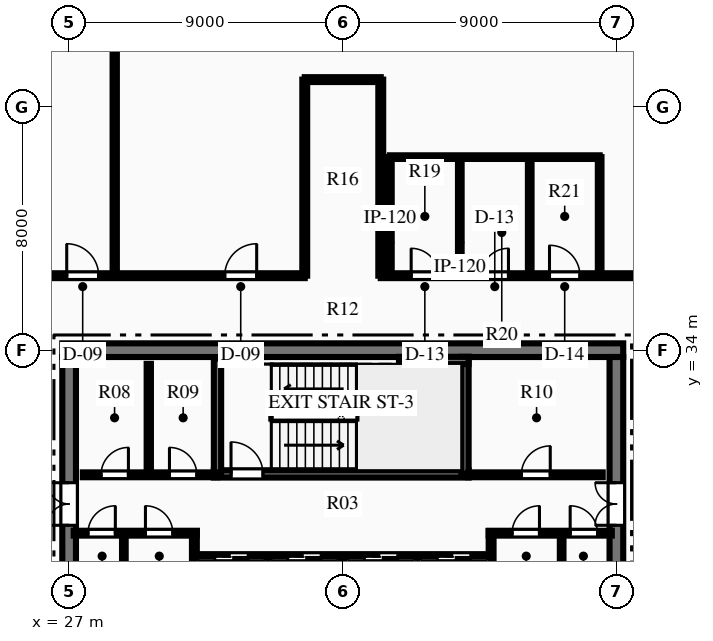
"""IFC4 building model, lengths in metres.
Left out: names, types, materials, properties, quantities, classifications, styles, units other than length and angle.
Written with IfcOpenShell. Run it as: python <this file> out.ifc"""

import sys

from ifc_helpers import new_model, si_unit, direction, frame, frame_2d, origin, place, context, subcontext, project, spatial, rectangle, extrude, element, fill, save


model = new_model("IFC4")
c1 = context("Model", 3, precision=1e-05, world=origin(), true_north=direction((0.0, 1.0)))
c2 = subcontext(c1, "Body", "Model", "MODEL_VIEW")
j1 = project(units=[si_unit("LENGTHUNIT", "METRE"), si_unit("PLANEANGLEUNIT", "RADIAN")], contexts=[c1])
p1 = place(None, origin())
s1 = spatial("IfcSite", under=j1, at=p1, CompositionType="ELEMENT")
p2 = place(p1, origin())
s2 = spatial("IfcBuilding", under=s1, at=p2, CompositionType="ELEMENT")
p3 = place(p2, frame((0.0, 0.0, 248.7)))
s3 = spatial("IfcBuildingStorey", under=s2, at=p3, CompositionType="ELEMENT", Elevation=248.7)
p4 = place(p3, frame((26.775, 34.0, 0.0), z_axis=(0.0, 0.0, 1.0), x_axis=(1.0, 0.0, 0.0)))
e1 = element("IfcWall", 1, at=p4, inside=s3, PredefinedType="SHEAR", context=c2, shape_type="SweptSolid", body=[
    extrude(rectangle(XDim=18.45, YDim=0.45, at=frame_2d((9.225, 0.0))), origin(), (0.0, 0.0, 1.0), 3.75),
])
p5 = place(p3, frame((27.0, 18.225, 0.0), z_axis=(0.0, 0.0, 1.0), x_axis=(0.0, 1.0, 0.0)))
e2 = element("IfcWall", 2, at=p5, inside=s3, PredefinedType="SHEAR", context=c2, shape_type="SweptSolid", body=[
    extrude(rectangle(XDim=15.55, YDim=0.45, at=frame_2d((7.775, 0.0))), origin(), (0.0, 0.0, 1.0), 3.75),
])
p6 = place(p5, frame((10.015, 0.0, 0.0)))
e3 = element("IfcOpeningElement", 3, at=p6, cuts=e2, PredefinedType="OPENING", context=c2, shape_type="SweptSolid", body=[
    extrude(rectangle(XDim=1.4, YDim=2.2, at=frame_2d((0.7, 1.1))), frame((0.0, 0.235, 0.0), z_axis=(0.0, -1.0, 0.0), x_axis=(1.0, 0.0, 0.0)), (0.0, 0.0, 1.0), 0.47),
])
p7 = place(p3, frame((45.0, 18.225, 0.0), z_axis=(0.0, 0.0, 1.0), x_axis=(0.0, 1.0, 0.0)))
e4 = element("IfcWall", 4, at=p7, inside=s3, PredefinedType="SHEAR", context=c2, shape_type="SweptSolid", body=[
    extrude(rectangle(XDim=15.55, YDim=0.45, at=frame_2d((7.775, 0.0))), origin(), (0.0, 0.0, 1.0), 3.75),
])
p8 = place(p7, frame((10.015, 0.0, 0.0)))
e5 = element("IfcOpeningElement", 5, at=p8, cuts=e4, PredefinedType="OPENING", context=c2, shape_type="SweptSolid", body=[
    extrude(rectangle(XDim=1.4, YDim=2.2, at=frame_2d((0.7, 1.1))), frame((0.0, 0.235, 0.0), z_axis=(0.0, -1.0, 0.0), x_axis=(1.0, 0.0, 0.0)), (0.0, 0.0, 1.0), 0.47),
])
p9 = place(p3, frame((31.76, 29.93, 0.0), z_axis=(0.0, 0.0, 1.0), x_axis=(1.0, 0.0, 0.0)))
e6 = element("IfcWall", 6, at=p9, inside=s3, PredefinedType="SHEAR", context=c2, shape_type="SweptSolid", body=[
    extrude(rectangle(XDim=8.38, YDim=0.24, at=frame_2d((4.19, 0.0))), origin(), (0.0, 0.0, 1.0), 3.75),
])
p10 = place(p9, frame((0.565, 0.0, 0.0)))
e7 = element("IfcOpeningElement", 7, at=p10, cuts=e6, PredefinedType="OPENING", context=c2, shape_type="SweptSolid", body=[
    extrude(rectangle(XDim=1.05, YDim=2.15, at=frame_2d((0.525, 1.075))), frame((0.0, 0.13, 0.0), z_axis=(0.0, -1.0, 0.0), x_axis=(1.0, 0.0, 0.0)), (0.0, 0.0, 1.0), 0.26),
])
p11 = place(p3, frame((31.88, 29.93, 0.0), z_axis=(0.0, 0.0, 1.0), x_axis=(0.0, 1.0, 0.0)))
e8 = element("IfcWall", 8, at=p11, inside=s3, PredefinedType="SHEAR", context=c2, shape_type="SweptSolid", body=[
    extrude(rectangle(XDim=3.79, YDim=0.24, at=frame_2d((1.895, 0.0))), origin(), (0.0, 0.0, 1.0), 3.75),
])
p12 = place(p3, frame((40.02, 29.93, 0.0), z_axis=(0.0, 0.0, 1.0), x_axis=(0.0, 1.0, 0.0)))
e9 = element("IfcWall", 9, at=p12, inside=s3, PredefinedType="SHEAR", context=c2, shape_type="SweptSolid", body=[
    extrude(rectangle(XDim=3.85, YDim=0.24, at=frame_2d((1.925, 0.0))), origin(), (0.0, 0.0, 1.0), 3.75),
])
p13 = place(p3, frame((37.85, 33.66, 0.0), z_axis=(0.0, 0.0, 1.0), x_axis=(1.0, 0.0, 0.0)))
e10 = element("IfcWall", 10, at=p13, inside=s3, PredefinedType="SHEAR", context=c2, shape_type="SweptSolid", body=[
    extrude(rectangle(XDim=2.29, YDim=0.24, at=frame_2d((1.145, 0.0))), origin(), (0.0, 0.0, 1.0), 3.75),
])
p14 = place(p3, frame((27.15, 27.98, 0.0), z_axis=(0.0, 0.0, 1.0), x_axis=(1.0, 0.0, 0.0)))
e11 = element("IfcWall", 11, at=p14, inside=s3, PredefinedType="PARTITIONING", context=c2, shape_type="SweptSolid", body=[
    extrude(rectangle(XDim=4.05, YDim=0.16, at=frame_2d((2.025, 0.0))), origin(), (0.0, 0.0, 1.0), 3.48),
])
p15 = place(p14, frame((0.47, 0.0, 0.0)))
e12 = element("IfcOpeningElement", 12, at=p15, cuts=e11, PredefinedType="OPENING", context=c2, shape_type="SweptSolid", body=[
    extrude(rectangle(XDim=0.9, YDim=2.15, at=frame_2d((0.45, 1.075))), frame((0.0, 0.09, 0.0), z_axis=(0.0, -1.0, 0.0), x_axis=(1.0, 0.0, 0.0)), (0.0, 0.0, 1.0), 0.18),
])
p16 = place(p14, frame((2.36, 0.0, 0.0)))
e13 = element("IfcOpeningElement", 13, at=p16, cuts=e11, PredefinedType="OPENING", context=c2, shape_type="SweptSolid", body=[
    extrude(rectangle(XDim=0.9, YDim=2.15, at=frame_2d((0.45, 1.075))), frame((0.0, 0.09, 0.0), z_axis=(0.0, -1.0, 0.0), x_axis=(1.0, 0.0, 0.0)), (0.0, 0.0, 1.0), 0.18),
])
p17 = place(p3, frame((31.12, 26.54, 0.0), z_axis=(0.0, 0.0, 1.0), x_axis=(0.0, 1.0, 0.0)))
e14 = element("IfcWall", 14, at=p17, inside=s3, PredefinedType="PARTITIONING", context=c2, shape_type="SweptSolid", body=[
    extrude(rectangle(XDim=1.51, YDim=0.16, at=frame_2d((0.755, 0.0))), origin(), (0.0, 0.0, 1.0), 3.48),
])
p18 = place(p3, frame((40.8, 27.98, 0.0), z_axis=(0.0, 0.0, 1.0), x_axis=(1.0, 0.0, 0.0)))
e15 = element("IfcWall", 15, at=p18, inside=s3, PredefinedType="PARTITIONING", context=c2, shape_type="SweptSolid", body=[
    extrude(rectangle(XDim=4.05, YDim=0.16, at=frame_2d((2.025, 0.0))), origin(), (0.0, 0.0, 1.0), 3.48),
])
p19 = place(p18, frame((0.77, 0.0, 0.0)))
e16 = element("IfcOpeningElement", 16, at=p19, cuts=e15, PredefinedType="OPENING", context=c2, shape_type="SweptSolid", body=[
    extrude(rectangle(XDim=0.9, YDim=2.15, at=frame_2d((0.45, 1.075))), frame((0.0, 0.09, 0.0), z_axis=(0.0, -1.0, 0.0), x_axis=(1.0, 0.0, 0.0)), (0.0, 0.0, 1.0), 0.18),
])
p20 = place(p18, frame((2.68, 0.0, 0.0)))
e17 = element("IfcOpeningElement", 17, at=p20, cuts=e15, PredefinedType="OPENING", context=c2, shape_type="SweptSolid", body=[
    extrude(rectangle(XDim=0.9, YDim=2.15, at=frame_2d((0.45, 1.075))), frame((0.0, 0.09, 0.0), z_axis=(0.0, -1.0, 0.0), x_axis=(1.0, 0.0, 0.0)), (0.0, 0.0, 1.0), 0.18),
])
p21 = place(p3, frame((40.88, 26.54, 0.0), z_axis=(0.0, 0.0, 1.0), x_axis=(0.0, 1.0, 0.0)))
e18 = element("IfcWall", 18, at=p21, inside=s3, PredefinedType="PARTITIONING", context=c2, shape_type="SweptSolid", body=[
    extrude(rectangle(XDim=1.51, YDim=0.16, at=frame_2d((0.755, 0.0))), origin(), (0.0, 0.0, 1.0), 3.48),
])
for number, where, z_axis, x_axis in (
    (19, (28.8, 26.54, 0.0), (0.0, 0.0, 1.0), (0.0, 1.0, 0.0)),
    (20, (43.2, 26.54, 0.0), (0.0, 0.0, 1.0), (0.0, 1.0, 0.0)),
):
    element("IfcWall", number, at=place(p3, frame(where, z_axis=z_axis, x_axis=x_axis)), inside=s3, PredefinedType="PARTITIONING", context=c2, shape_type="SweptSolid", body=[
        extrude(rectangle(XDim=1.44, YDim=0.12, at=frame_2d((0.72, 0.0))), origin(), (0.0, 0.0, 1.0), 3.48),
    ])
p22 = place(p3, frame((27.45, 29.9, 0.0), z_axis=(0.0, 0.0, 1.0), x_axis=(1.0, 0.0, 0.0)))
e21 = element("IfcWall", 21, at=p22, inside=s3, PredefinedType="PARTITIONING", context=c2, shape_type="SweptSolid", body=[
    extrude(rectangle(XDim=4.43, YDim=0.16, at=frame_2d((2.215, 0.0))), origin(), (0.0, 0.0, 1.0), 3.48),
])
p23 = place(p22, frame((0.6, 0.0, 0.0)))
e22 = element("IfcOpeningElement", 22, at=p23, cuts=e21, PredefinedType="OPENING", context=c2, shape_type="SweptSolid", body=[
    extrude(rectangle(XDim=0.9, YDim=2.15, at=frame_2d((0.45, 1.075))), frame((0.0, 0.09, 0.0), z_axis=(0.0, -1.0, 0.0), x_axis=(1.0, 0.0, 0.0)), (0.0, 0.0, 1.0), 0.18),
])
p24 = place(p22, frame((2.85, 0.0, 0.0)))
e23 = element("IfcOpeningElement", 23, at=p24, cuts=e21, PredefinedType="OPENING", context=c2, shape_type="SweptSolid", body=[
    extrude(rectangle(XDim=0.9, YDim=2.15, at=frame_2d((0.45, 1.075))), frame((0.0, 0.09, 0.0), z_axis=(0.0, -1.0, 0.0), x_axis=(1.0, 0.0, 0.0)), (0.0, 0.0, 1.0), 0.18),
])
p25 = place(p3, frame((29.62, 29.95, 0.0), z_axis=(0.0, 0.0, 1.0), x_axis=(0.0, 1.0, 0.0)))
e24 = element("IfcWall", 24, at=p25, inside=s3, PredefinedType="PARTITIONING", context=c2, shape_type="SweptSolid", body=[
    extrude(rectangle(XDim=3.6, YDim=0.14, at=frame_2d((1.8, 0.0))), origin(), (0.0, 0.0, 1.0), 3.48),
])
p26 = place(p3, frame((40.12, 29.9, 0.0), z_axis=(0.0, 0.0, 1.0), x_axis=(1.0, 0.0, 0.0)))
e25 = element("IfcWall", 25, at=p26, inside=s3, PredefinedType="PARTITIONING", context=c2, shape_type="SweptSolid", body=[
    extrude(rectangle(XDim=4.43, YDim=0.16, at=frame_2d((2.215, 0.0))), origin(), (0.0, 0.0, 1.0), 3.48),
])
p27 = place(p26, frame((1.755, 0.0, 0.0)))
e26 = element("IfcOpeningElement", 26, at=p27, cuts=e25, PredefinedType="OPENING", context=c2, shape_type="SweptSolid", body=[
    extrude(rectangle(XDim=0.95, YDim=2.15, at=frame_2d((0.475, 1.075))), frame((0.0, 0.09, 0.0), z_axis=(0.0, -1.0, 0.0), x_axis=(1.0, 0.0, 0.0)), (0.0, 0.0, 1.0), 0.18),
])
p28 = place(p3, frame((31.2, 27.2, 0.0), z_axis=(0.0, 0.0, 1.0), x_axis=(1.0, 0.0, 0.0)))
e27 = element("IfcWall", 27, at=p28, inside=s3, PredefinedType="PARTITIONING", context=c2, shape_type="SweptSolid", body=[
    extrude(rectangle(XDim=9.6, YDim=0.18, at=frame_2d((4.8, 0.0))), origin(), (0.0, 0.0, 1.0), 3.48),
])
p29 = place(p28, frame((0.59, 0.0, 0.0)))
e28 = element("IfcOpeningElement", 28, at=p29, cuts=e27, PredefinedType="OPENING", context=c2, shape_type="SweptSolid", body=[
    extrude(rectangle(XDim=1.1, YDim=2.15, at=frame_2d((0.55, 1.075))), frame((0.0, 0.1, 0.0), z_axis=(0.0, -1.0, 0.0), x_axis=(1.0, 0.0, 0.0)), (0.0, 0.0, 1.0), 0.2),
])
p30 = place(p28, frame((2.99, 0.0, 0.0)))
e29 = element("IfcOpeningElement", 29, at=p30, cuts=e27, PredefinedType="OPENING", context=c2, shape_type="SweptSolid", body=[
    extrude(rectangle(XDim=1.1, YDim=2.15, at=frame_2d((0.55, 1.075))), frame((0.0, 0.1, 0.0), z_axis=(0.0, -1.0, 0.0), x_axis=(1.0, 0.0, 0.0)), (0.0, 0.0, 1.0), 0.2),
])
p31 = place(p28, frame((5.51, 0.0, 0.0)))
e30 = element("IfcOpeningElement", 30, at=p31, cuts=e27, PredefinedType="OPENING", context=c2, shape_type="SweptSolid", body=[
    extrude(rectangle(XDim=1.1, YDim=2.15, at=frame_2d((0.55, 1.075))), frame((0.0, 0.1, 0.0), z_axis=(0.0, -1.0, 0.0), x_axis=(1.0, 0.0, 0.0)), (0.0, 0.0, 1.0), 0.2),
])
p32 = place(p28, frame((7.91, 0.0, 0.0)))
e31 = element("IfcOpeningElement", 31, at=p32, cuts=e27, PredefinedType="OPENING", context=c2, shape_type="SweptSolid", body=[
    extrude(rectangle(XDim=1.1, YDim=2.15, at=frame_2d((0.55, 1.075))), frame((0.0, 0.1, 0.0), z_axis=(0.0, -1.0, 0.0), x_axis=(1.0, 0.0, 0.0)), (0.0, 0.0, 1.0), 0.2),
])
for number, where, z_axis, x_axis in (
    (32, (33.54, 25.3, 0.0), (0.0, 0.0, 1.0), (0.0, 1.0, 0.0)),
    (33, (36.0, 25.3, 0.0), (0.0, 0.0, 1.0), (0.0, 1.0, 0.0)),
    (34, (38.46, 25.3, 0.0), (0.0, 0.0, 1.0), (0.0, 1.0, 0.0)),
):
    element("IfcWall", number, at=place(p3, frame(where, z_axis=z_axis, x_axis=x_axis)), inside=s3, PredefinedType="PARTITIONING", context=c2, shape_type="SweptSolid", body=[
        extrude(rectangle(XDim=1.9, YDim=0.18, at=frame_2d((0.95, 0.0))), origin(), (0.0, 0.0, 1.0), 3.48),
    ])
p33 = place(p3, frame((24.5, 36.45, 0.0), z_axis=(0.0, 0.0, 1.0), x_axis=(1.0, 0.0, 0.0)))
e35 = element("IfcWall", 35, at=p33, inside=s3, PredefinedType="PARTITIONING", context=c2, shape_type="SweptSolid", body=[
    extrude(rectangle(XDim=10.25, YDim=0.16, at=frame_2d((5.125, 0.0))), origin(), (0.0, 0.0, 1.0), 3.48),
])
p34 = place(p33, frame((2.421, 0.0, 0.0)))
e36 = element("IfcOpeningElement", 36, at=p34, cuts=e35, PredefinedType="OPENING", context=c2, shape_type="SweptSolid", body=[
    extrude(rectangle(XDim=1.05, YDim=2.15, at=frame_2d((0.525, 1.075))), frame((0.0, 0.09, 0.0), z_axis=(0.0, -1.0, 0.0), x_axis=(1.0, 0.0, 0.0)), (0.0, 0.0, 1.0), 0.18),
])
p35 = place(p33, frame((7.619, 0.0, 0.0)))
e37 = element("IfcOpeningElement", 37, at=p35, cuts=e35, PredefinedType="OPENING", context=c2, shape_type="SweptSolid", body=[
    extrude(rectangle(XDim=1.05, YDim=2.15, at=frame_2d((0.525, 1.075))), frame((0.0, 0.09, 0.0), z_axis=(0.0, -1.0, 0.0), x_axis=(1.0, 0.0, 0.0)), (0.0, 0.0, 1.0), 0.18),
])
p36 = place(p3, frame((37.25, 36.45, 0.0), z_axis=(0.0, 0.0, 1.0), x_axis=(1.0, 0.0, 0.0)))
e38 = element("IfcWall", 38, at=p36, inside=s3, PredefinedType="PARTITIONING", context=c2, shape_type="SweptSolid", body=[
    extrude(rectangle(XDim=10.25, YDim=0.16, at=frame_2d((5.125, 0.0))), origin(), (0.0, 0.0, 1.0), 3.48),
])
p37 = place(p36, frame((1.0, 0.0, 0.0)))
e39 = element("IfcOpeningElement", 39, at=p37, cuts=e38, PredefinedType="OPENING", context=c2, shape_type="SweptSolid", body=[
    extrude(rectangle(XDim=0.9, YDim=2.15, at=frame_2d((0.45, 1.075))), frame((0.0, 0.09, 0.0), z_axis=(0.0, -1.0, 0.0), x_axis=(1.0, 0.0, 0.0)), (0.0, 0.0, 1.0), 0.18),
])
p38 = place(p36, frame((3.3, 0.0, 0.0)))
e40 = element("IfcOpeningElement", 40, at=p38, cuts=e38, PredefinedType="OPENING", context=c2, shape_type="SweptSolid", body=[
    extrude(rectangle(XDim=0.9, YDim=2.15, at=frame_2d((0.45, 1.075))), frame((0.0, 0.09, 0.0), z_axis=(0.0, -1.0, 0.0), x_axis=(1.0, 0.0, 0.0)), (0.0, 0.0, 1.0), 0.18),
])
p39 = place(p36, frame((5.55, 0.0, 0.0)))
e41 = element("IfcOpeningElement", 41, at=p39, cuts=e38, PredefinedType="OPENING", context=c2, shape_type="SweptSolid", body=[
    extrude(rectangle(XDim=1.0, YDim=2.15, at=frame_2d((0.5, 1.075))), frame((0.0, 0.09, 0.0), z_axis=(0.0, -1.0, 0.0), x_axis=(1.0, 0.0, 0.0)), (0.0, 0.0, 1.0), 0.18),
])
for number, where, z_axis, x_axis in (
    (42, (34.75, 36.45, 0.0), (0.0, 0.0, 1.0), (0.0, 1.0, 0.0)),
    (43, (37.25, 36.45, 0.0), (0.0, 0.0, 1.0), (0.0, 1.0, 0.0)),
):
    element("IfcWall", number, at=place(p3, frame(where, z_axis=z_axis, x_axis=x_axis)), inside=s3, PredefinedType="PARTITIONING", context=c2, shape_type="SweptSolid", body=[
        extrude(rectangle(XDim=6.45, YDim=0.16, at=frame_2d((3.225, 0.0))), origin(), (0.0, 0.0, 1.0), 3.48),
    ])
p40 = place(p3, frame((34.75, 42.9, 0.0), z_axis=(0.0, 0.0, 1.0), x_axis=(1.0, 0.0, 0.0)))
e44 = element("IfcWall", 44, at=p40, inside=s3, PredefinedType="PARTITIONING", context=c2, shape_type="SweptSolid", body=[
    extrude(rectangle(XDim=2.5, YDim=0.16, at=frame_2d((1.25, 0.0))), origin(), (0.0, 0.0, 1.0), 3.48),
])
for number, where, z_axis, x_axis in (
    (45, (37.55, 36.45, 0.0), (0.0, 0.0, 1.0), (0.0, 1.0, 0.0)),
    (46, (39.85, 36.45, 0.0), (0.0, 0.0, 1.0), (0.0, 1.0, 0.0)),
    (47, (42.15, 36.45, 0.0), (0.0, 0.0, 1.0), (0.0, 1.0, 0.0)),
    (48, (44.45, 36.45, 0.0), (0.0, 0.0, 1.0), (0.0, 1.0, 0.0)),
):
    element("IfcWall", number, at=place(p3, frame(where, z_axis=z_axis, x_axis=x_axis)), inside=s3, PredefinedType="PARTITIONING", context=c2, shape_type="SweptSolid", body=[
        extrude(rectangle(XDim=3.9, YDim=0.12, at=frame_2d((1.95, 0.0))), origin(), (0.0, 0.0, 1.0), 3.48),
    ])
p41 = place(p3, frame((37.55, 40.35, 0.0), z_axis=(0.0, 0.0, 1.0), x_axis=(1.0, 0.0, 0.0)))
e49 = element("IfcWall", 49, at=p41, inside=s3, PredefinedType="PARTITIONING", context=c2, shape_type="SweptSolid", body=[
    extrude(rectangle(XDim=6.9, YDim=0.12, at=frame_2d((3.45, 0.0))), origin(), (0.0, 0.0, 1.0), 3.48),
])
p42 = place(p3, frame((28.5, 36.45, 0.0), z_axis=(0.0, 0.0, 1.0), x_axis=(0.0, 1.0, 0.0)))
e50 = element("IfcWall", 50, at=p42, inside=s3, PredefinedType="PARTITIONING", context=c2, shape_type="SweptSolid", body=[
    extrude(rectangle(XDim=15.964, YDim=0.14, at=frame_2d((7.982, 0.0))), origin(), (0.0, 0.0, 1.0), 3.48),
])
p43 = place(p15, origin())
e51 = element("IfcDoor", 51, at=p43, inside=s3, OperationType="SINGLE_SWING_RIGHT", PredefinedType="DOOR", context=c2, shape_type="SweptSolid", body=[
    extrude(rectangle(XDim=0.9, YDim=2.15, at=frame_2d((0.45, 1.075))), frame((0.0, 0.025, 0.0), z_axis=(0.0, -1.0, 0.0), x_axis=(1.0, 0.0, 0.0)), (0.0, 0.0, 1.0), 0.05),
])
fill(e12, e51)
p44 = place(p16, origin())
e52 = element("IfcDoor", 52, at=p44, inside=s3, OperationType="SINGLE_SWING_LEFT", PredefinedType="DOOR", context=c2, shape_type="SweptSolid", body=[
    extrude(rectangle(XDim=0.9, YDim=2.15, at=frame_2d((0.45, 1.075))), frame((0.0, 0.025, 0.0), z_axis=(0.0, -1.0, 0.0), x_axis=(1.0, 0.0, 0.0)), (0.0, 0.0, 1.0), 0.05),
])
fill(e13, e52)
p45 = place(p19, origin())
e53 = element("IfcDoor", 53, at=p45, inside=s3, OperationType="SINGLE_SWING_RIGHT", PredefinedType="DOOR", context=c2, shape_type="SweptSolid", body=[
    extrude(rectangle(XDim=0.9, YDim=2.15, at=frame_2d((0.45, 1.075))), frame((0.0, 0.025, 0.0), z_axis=(0.0, -1.0, 0.0), x_axis=(1.0, 0.0, 0.0)), (0.0, 0.0, 1.0), 0.05),
])
fill(e16, e53)
p46 = place(p20, origin())
e54 = element("IfcDoor", 54, at=p46, inside=s3, OperationType="SINGLE_SWING_LEFT", PredefinedType="DOOR", context=c2, shape_type="SweptSolid", body=[
    extrude(rectangle(XDim=0.9, YDim=2.15, at=frame_2d((0.45, 1.075))), frame((0.0, 0.025, 0.0), z_axis=(0.0, -1.0, 0.0), x_axis=(1.0, 0.0, 0.0)), (0.0, 0.0, 1.0), 0.05),
])
fill(e17, e54)
p47 = place(p23, origin())
e55 = element("IfcDoor", 55, at=p47, inside=s3, OperationType="SINGLE_SWING_RIGHT", PredefinedType="DOOR", context=c2, shape_type="SweptSolid", body=[
    extrude(rectangle(XDim=0.9, YDim=2.15, at=frame_2d((0.45, 1.075))), frame((0.0, 0.025, 0.0), z_axis=(0.0, -1.0, 0.0), x_axis=(1.0, 0.0, 0.0)), (0.0, 0.0, 1.0), 0.05),
])
fill(e22, e55)
p48 = place(p24, origin())
e56 = element("IfcDoor", 56, at=p48, inside=s3, OperationType="SINGLE_SWING_LEFT", PredefinedType="DOOR", context=c2, shape_type="SweptSolid", body=[
    extrude(rectangle(XDim=0.9, YDim=2.15, at=frame_2d((0.45, 1.075))), frame((0.0, 0.025, 0.0), z_axis=(0.0, -1.0, 0.0), x_axis=(1.0, 0.0, 0.0)), (0.0, 0.0, 1.0), 0.05),
])
fill(e23, e56)
p49 = place(p27, origin())
e57 = element("IfcDoor", 57, at=p49, inside=s3, OperationType="SINGLE_SWING_RIGHT", PredefinedType="DOOR", context=c2, shape_type="SweptSolid", body=[
    extrude(rectangle(XDim=0.95, YDim=2.15, at=frame_2d((0.475, 1.075))), frame((0.0, 0.025, 0.0), z_axis=(0.0, -1.0, 0.0), x_axis=(1.0, 0.0, 0.0)), (0.0, 0.0, 1.0), 0.05),
])
fill(e26, e57)
p50 = place(p10, origin())
e58 = element("IfcDoor", 58, at=p50, inside=s3, OperationType="SINGLE_SWING_LEFT", PredefinedType="DOOR", context=c2, shape_type="SweptSolid", body=[
    extrude(rectangle(XDim=1.05, YDim=2.15, at=frame_2d((0.525, 1.075))), frame((0.0, 0.025, 0.0), z_axis=(0.0, -1.0, 0.0), x_axis=(1.0, 0.0, 0.0)), (0.0, 0.0, 1.0), 0.05),
])
fill(e7, e58)
p51 = place(p6, origin())
e59 = element("IfcDoor", 59, at=p51, inside=s3, OperationType="DOUBLE_DOOR_SINGLE_SWING", PredefinedType="DOOR", context=c2, shape_type="SweptSolid", body=[
    extrude(rectangle(XDim=1.4, YDim=2.2, at=frame_2d((0.7, 1.1))), frame((0.0, 0.025, 0.0), z_axis=(0.0, -1.0, 0.0), x_axis=(1.0, 0.0, 0.0)), (0.0, 0.0, 1.0), 0.05),
])
fill(e3, e59)
p52 = place(p8, origin())
e60 = element("IfcDoor", 60, at=p52, inside=s3, OperationType="DOUBLE_DOOR_SINGLE_SWING", PredefinedType="DOOR", context=c2, shape_type="SweptSolid", body=[
    extrude(rectangle(XDim=1.4, YDim=2.2, at=frame_2d((0.7, 1.1))), frame((0.0, 0.025, 0.0), z_axis=(0.0, -1.0, 0.0), x_axis=(1.0, 0.0, 0.0)), (0.0, 0.0, 1.0), 0.05),
])
fill(e5, e60)
p53 = place(p37, origin())
e61 = element("IfcDoor", 61, at=p53, inside=s3, OperationType="SINGLE_SWING_LEFT", PredefinedType="DOOR", context=c2, shape_type="SweptSolid", body=[
    extrude(rectangle(XDim=0.9, YDim=2.15, at=frame_2d((0.45, 1.075))), frame((0.0, 0.025, 0.0), z_axis=(0.0, -1.0, 0.0), x_axis=(1.0, 0.0, 0.0)), (0.0, 0.0, 1.0), 0.05),
])
fill(e39, e61)
p54 = place(p38, origin())
e62 = element("IfcDoor", 62, at=p54, inside=s3, OperationType="SINGLE_SWING_RIGHT", PredefinedType="DOOR", context=c2, shape_type="SweptSolid", body=[
    extrude(rectangle(XDim=0.9, YDim=2.15, at=frame_2d((0.45, 1.075))), frame((0.0, 0.025, 0.0), z_axis=(0.0, -1.0, 0.0), x_axis=(1.0, 0.0, 0.0)), (0.0, 0.0, 1.0), 0.05),
])
fill(e40, e62)
p55 = place(p39, origin())
e63 = element("IfcDoor", 63, at=p55, inside=s3, OperationType="SINGLE_SWING_LEFT", PredefinedType="DOOR", context=c2, shape_type="SweptSolid", body=[
    extrude(rectangle(XDim=1.0, YDim=2.15, at=frame_2d((0.5, 1.075))), frame((0.0, 0.025, 0.0), z_axis=(0.0, -1.0, 0.0), x_axis=(1.0, 0.0, 0.0)), (0.0, 0.0, 1.0), 0.05),
])
fill(e41, e63)
p56 = place(p34, origin())
e64 = element("IfcDoor", 64, at=p56, inside=s3, OperationType="SINGLE_SWING_LEFT", PredefinedType="DOOR", context=c2, shape_type="SweptSolid", body=[
    extrude(rectangle(XDim=1.05, YDim=2.15, at=frame_2d((0.525, 1.075))), frame((0.0, 0.025, 0.0), z_axis=(0.0, -1.0, 0.0), x_axis=(1.0, 0.0, 0.0)), (0.0, 0.0, 1.0), 0.05),
])
fill(e36, e64)
p57 = place(p35, origin())
e65 = element("IfcDoor", 65, at=p57, inside=s3, OperationType="SINGLE_SWING_RIGHT", PredefinedType="DOOR", context=c2, shape_type="SweptSolid", body=[
    extrude(rectangle(XDim=1.05, YDim=2.15, at=frame_2d((0.525, 1.075))), frame((0.0, 0.025, 0.0), z_axis=(0.0, -1.0, 0.0), x_axis=(1.0, 0.0, 0.0)), (0.0, 0.0, 1.0), 0.05),
])
fill(e37, e65)
p58 = place(p29, origin())
e66 = element("IfcDoor", 66, at=p58, inside=s3, OperationType="SLIDING_TO_LEFT", PredefinedType="DOOR", context=c2, shape_type="SweptSolid", body=[
    extrude(rectangle(XDim=1.1, YDim=2.15, at=frame_2d((0.55, 1.075))), frame((0.0, 0.025, 0.0), z_axis=(0.0, -1.0, 0.0), x_axis=(1.0, 0.0, 0.0)), (0.0, 0.0, 1.0), 0.05),
])
fill(e28, e66)
p59 = place(p30, origin())
e67 = element("IfcDoor", 67, at=p59, inside=s3, OperationType="SLIDING_TO_LEFT", PredefinedType="DOOR", context=c2, shape_type="SweptSolid", body=[
    extrude(rectangle(XDim=1.1, YDim=2.15, at=frame_2d((0.55, 1.075))), frame((0.0, 0.025, 0.0), z_axis=(0.0, -1.0, 0.0), x_axis=(1.0, 0.0, 0.0)), (0.0, 0.0, 1.0), 0.05),
])
fill(e29, e67)
p60 = place(p31, origin())
e68 = element("IfcDoor", 68, at=p60, inside=s3, OperationType="SLIDING_TO_LEFT", PredefinedType="DOOR", context=c2, shape_type="SweptSolid", body=[
    extrude(rectangle(XDim=1.1, YDim=2.15, at=frame_2d((0.55, 1.075))), frame((0.0, 0.025, 0.0), z_axis=(0.0, -1.0, 0.0), x_axis=(1.0, 0.0, 0.0)), (0.0, 0.0, 1.0), 0.05),
])
fill(e30, e68)
p61 = place(p32, origin())
e69 = element("IfcDoor", 69, at=p61, inside=s3, OperationType="SLIDING_TO_LEFT", PredefinedType="DOOR", context=c2, shape_type="SweptSolid", body=[
    extrude(rectangle(XDim=1.1, YDim=2.15, at=frame_2d((0.55, 1.075))), frame((0.0, 0.025, 0.0), z_axis=(0.0, -1.0, 0.0), x_axis=(1.0, 0.0, 0.0)), (0.0, 0.0, 1.0), 0.05),
])
fill(e31, e69)
save(model, sys.argv[1])
